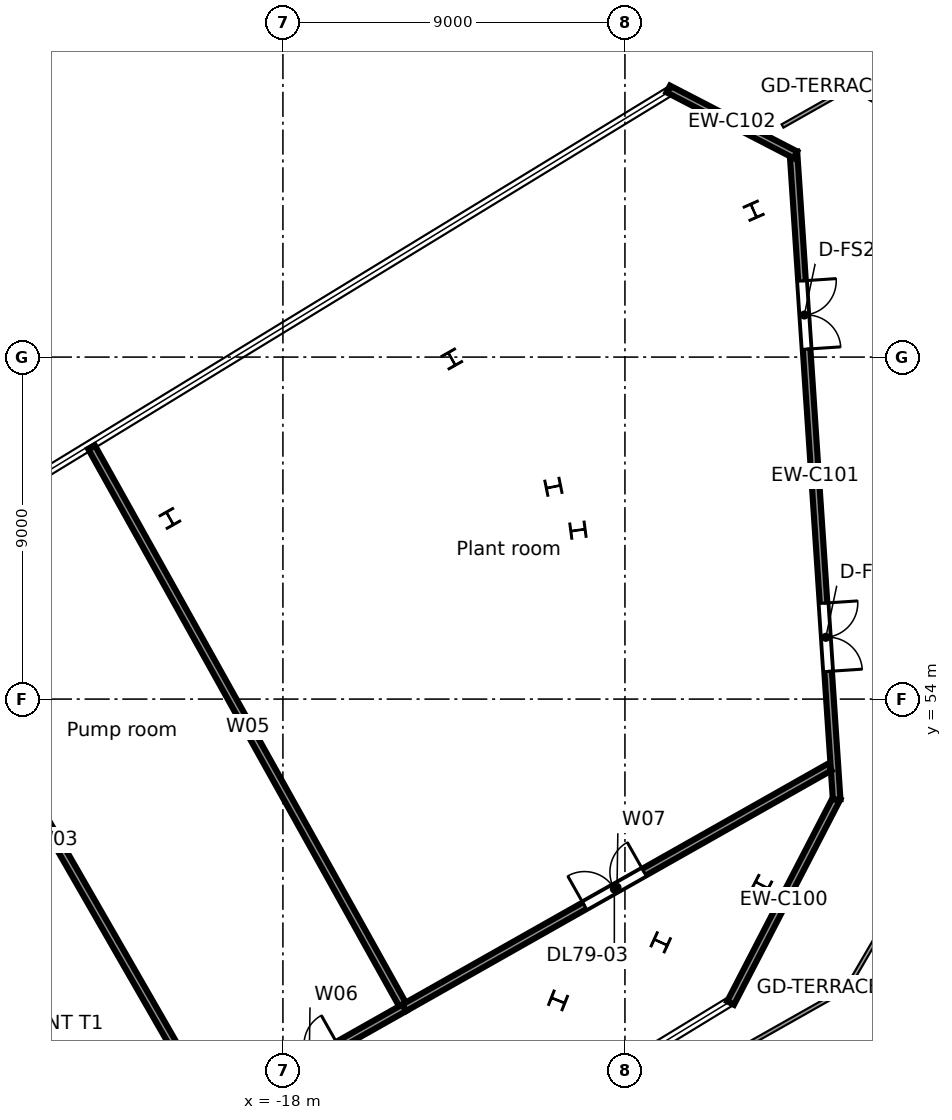
"""IFC4 building model, lengths in metres.
Left out: names, types, materials, properties, quantities, classifications, styles, units other than length and angle.
Written with IfcOpenShell. Run it as: python <this file> out.ifc"""

import sys

from ifc_helpers import new_model, si_unit, direction, frame, frame_2d, origin, origin_2d, place, context, subcontext, project, spatial, rectangle, i_section, extrude, element, fill, save


model = new_model("IFC4")
c1 = context("Model", 3, precision=1e-05, world=origin(), true_north=direction((0.0, 1.0)))
c2 = subcontext(c1, "Body", "Model", "MODEL_VIEW")
j1 = project(units=[si_unit("LENGTHUNIT", "METRE"), si_unit("PLANEANGLEUNIT", "RADIAN")], contexts=[c1])
p1 = place(None, origin())
s1 = spatial("IfcSite", under=j1, at=p1, CompositionType="ELEMENT")
p2 = place(p1, origin())
s2 = spatial("IfcBuilding", under=s1, at=p2, CompositionType="ELEMENT")
p3 = place(p2, frame((0.0, 0.0, 346.9)))
s3 = spatial("IfcBuildingStorey", under=s2, at=p3, CompositionType="ELEMENT", Elevation=346.9)
for number, where, z_axis, x_axis in (
    (1, (-5.398, 49.104, -0.3), (0.0, 0.0, 1.0), (0.46, 0.888, 0.0)),
    (2, (-5.613, 66.852, -0.3), (0.0, 0.0, 1.0), (-0.915, -0.404, 0.0)),
    (3, (-13.556, 62.952, -0.3), (0.0, 0.0, 1.0), (-0.87, -0.492, 0.0)),
    (4, (-20.974, 58.755, -0.3), (0.0, 0.0, 1.0), (-0.87, -0.492, 0.0)),
    (5, (-8.058, 47.599, -0.3), (0.0, 0.0, 1.0), (0.415, 0.91, 0.0)),
    (6, (-10.237, 58.445, -0.3), (0.0, 0.0, 1.0), (-0.133, 0.991, 0.0)),
    (7, (-10.76, 46.071, -0.3), (0.0, 0.0, 1.0), (0.369, 0.929, 0.0)),
    (8, (-10.882, 59.587, -0.3), (0.0, 0.0, 1.0), (-0.199, 0.98, 0.0)),
):
    element("IfcColumn", number, at=place(p3, frame(where, z_axis=z_axis, x_axis=x_axis)), inside=s3, PredefinedType="COLUMN", context=c2, shape_type="SweptSolid", body=[
        extrude(i_section(OverallWidth=0.4, OverallDepth=0.4, WebThickness=0.013, FlangeThickness=0.021, FilletRadius=0.022, at=origin_2d()), origin(), (0.0, 0.0, 1.0), 3.9),
    ])
p4 = place(p3, frame((-3.418, 51.41, 0.0), z_axis=(0.0, 0.0, 1.0), x_axis=(-0.459961474469, -0.887938872899, 0.0)))
e9 = element("IfcWall", 9, at=p4, inside=s3, PredefinedType="STANDARD", context=c2, shape_type="SweptSolid", body=[
    extrude(rectangle(XDim=6.091, YDim=0.2, at=frame_2d((3.046, 0.0))), origin(), (0.0, 0.0, 1.0), 3.3),
])
p5 = place(p3, frame((-4.567, 68.404, 0.0), z_axis=(0.0, 0.0, 1.0), x_axis=(0.066621445169, -0.997778323599, 0.0)))
e10 = element("IfcWall", 10, at=p5, inside=s3, PredefinedType="STANDARD", context=c2, shape_type="SweptSolid", body=[
    extrude(rectangle(XDim=17.084, YDim=0.2, at=frame_2d((8.542, 0.0))), origin(), (0.0, 0.0, 1.0), 3.3),
])
p6 = place(p5, frame((11.906, 0.0, 0.0)))
e11 = element("IfcOpeningElement", 11, at=p6, cuts=e10, PredefinedType="OPENING", context=c2, shape_type="SweptSolid", body=[
    extrude(rectangle(XDim=1.8, YDim=2.4, at=frame_2d((0.9, 1.2))), frame((0.0, 0.11, 0.0), z_axis=(0.0, -1.0, 0.0), x_axis=(1.0, 0.0, 0.0)), (0.0, 0.0, 1.0), 0.22),
])
p7 = place(p5, frame((3.406, 0.0, 0.0)))
e12 = element("IfcOpeningElement", 12, at=p7, cuts=e10, PredefinedType="OPENING", context=c2, shape_type="SweptSolid", body=[
    extrude(rectangle(XDim=1.8, YDim=2.4, at=frame_2d((0.9, 1.2))), frame((0.0, 0.11, 0.0), z_axis=(0.0, -1.0, 0.0), x_axis=(1.0, 0.0, 0.0)), (0.0, 0.0, 1.0), 0.22),
])
p8 = place(p3, frame((-7.86, 70.055, 0.0), z_axis=(0.0, 0.0, 1.0), x_axis=(0.887922126938, -0.459993800495, 0.0)))
e13 = element("IfcWall", 13, at=p8, inside=s3, PredefinedType="STANDARD", context=c2, shape_type="SweptSolid", body=[
    extrude(rectangle(XDim=3.769, YDim=0.2, at=frame_2d((1.884, 0.0))), origin(), (0.0, 0.0, 1.0), 3.3),
])
p9 = place(p3, frame((-28.131, 57.521, 0.0), z_axis=(0.0, 0.0, 1.0), x_axis=(0.498362592797, -0.866968699609, 0.0)))
e14 = element("IfcWall", 14, at=p9, inside=s3, PredefinedType="PARTITIONING", context=c2, shape_type="SweptSolid", body=[
    extrude(rectangle(XDim=16.695, YDim=0.2, at=frame_2d((8.347, 0.0))), origin(), (0.0, 0.0, 1.0), 2.68),
])
p10 = place(p3, frame((-23.037, 60.631, 0.0), z_axis=(0.0, 0.0, 1.0), x_axis=(0.487224959402, -0.873276496269, 0.0)))
e15 = element("IfcWall", 15, at=p10, inside=s3, PredefinedType="PARTITIONING", context=c2, shape_type="SweptSolid", body=[
    extrude(rectangle(XDim=16.894, YDim=0.2, at=frame_2d((8.447, 0.0))), origin(), (0.0, 0.0, 1.0), 2.68),
])
p11 = place(p3, frame((-19.811, 43.047, 0.0), z_axis=(0.0, 0.0, 1.0), x_axis=(0.870426794604, 0.492297872467, 0.0)))
e16 = element("IfcWall", 16, at=p11, inside=s3, PredefinedType="PARTITIONING", context=c2, shape_type="SweptSolid", body=[
    extrude(rectangle(XDim=5.75, YDim=0.2, at=frame_2d((2.875, 0.0))), origin(), (0.0, 0.0, 1.0), 3.3),
])
p12 = place(p11, frame((1.95, 0.0, 0.0)))
e17 = element("IfcOpeningElement", 17, at=p12, cuts=e16, PredefinedType="OPENING", context=c2, shape_type="SweptSolid", body=[
    extrude(rectangle(XDim=1.8, YDim=2.1, at=frame_2d((0.9, 1.05))), frame((0.0, 0.11, 0.0), z_axis=(0.0, -1.0, 0.0), x_axis=(1.0, 0.0, 0.0)), (0.0, 0.0, 1.0), 0.22),
])
p13 = place(p3, frame((-14.806, 45.878, 0.0), z_axis=(0.0, 0.0, 1.0), x_axis=(0.870379652776, 0.492381214136, 0.0)))
e18 = element("IfcWall", 18, at=p13, inside=s3, PredefinedType="PARTITIONING", context=c2, shape_type="SweptSolid", body=[
    extrude(rectangle(XDim=12.862, YDim=0.2, at=frame_2d((6.431, 0.0))), origin(), (0.0, 0.0, 1.0), 2.68),
])
p14 = place(p13, frame((5.45, 0.0, 0.0)))
e19 = element("IfcOpeningElement", 19, at=p14, cuts=e18, PredefinedType="OPENING", context=c2, shape_type="SweptSolid", body=[
    extrude(rectangle(XDim=1.8, YDim=2.1, at=frame_2d((0.9, 1.05))), frame((0.0, 0.11, 0.0), z_axis=(0.0, -1.0, 0.0), x_axis=(1.0, 0.0, 0.0)), (0.0, 0.0, 1.0), 0.22),
])
p15 = place(p6, origin())
e20 = element("IfcDoor", 20, at=p15, inside=s3, OperationType="DOUBLE_DOOR_SINGLE_SWING", PredefinedType="DOOR", context=c2, shape_type="SweptSolid", body=[
    extrude(rectangle(XDim=1.8, YDim=2.4, at=frame_2d((0.9, 1.2))), frame((0.0, 0.025, 0.0), z_axis=(0.0, -1.0, 0.0), x_axis=(1.0, 0.0, 0.0)), (0.0, 0.0, 1.0), 0.05),
])
fill(e11, e20)
p16 = place(p7, origin())
e21 = element("IfcDoor", 21, at=p16, inside=s3, OperationType="DOUBLE_DOOR_SINGLE_SWING", PredefinedType="DOOR", context=c2, shape_type="SweptSolid", body=[
    extrude(rectangle(XDim=1.8, YDim=2.4, at=frame_2d((0.9, 1.2))), frame((0.0, 0.025, 0.0), z_axis=(0.0, -1.0, 0.0), x_axis=(1.0, 0.0, 0.0)), (0.0, 0.0, 1.0), 0.05),
])
fill(e12, e21)
p17 = place(p14, origin())
e22 = element("IfcDoor", 22, at=p17, inside=s3, OperationType="DOUBLE_DOOR_SINGLE_SWING", PredefinedType="DOOR", context=c2, shape_type="SweptSolid", body=[
    extrude(rectangle(XDim=1.8, YDim=2.1, at=frame_2d((0.9, 1.05))), frame((0.0, 0.025, 0.0), z_axis=(0.0, -1.0, 0.0), x_axis=(1.0, 0.0, 0.0)), (0.0, 0.0, 1.0), 0.05),
])
fill(e19, e22)
save(model, sys.argv[1])
